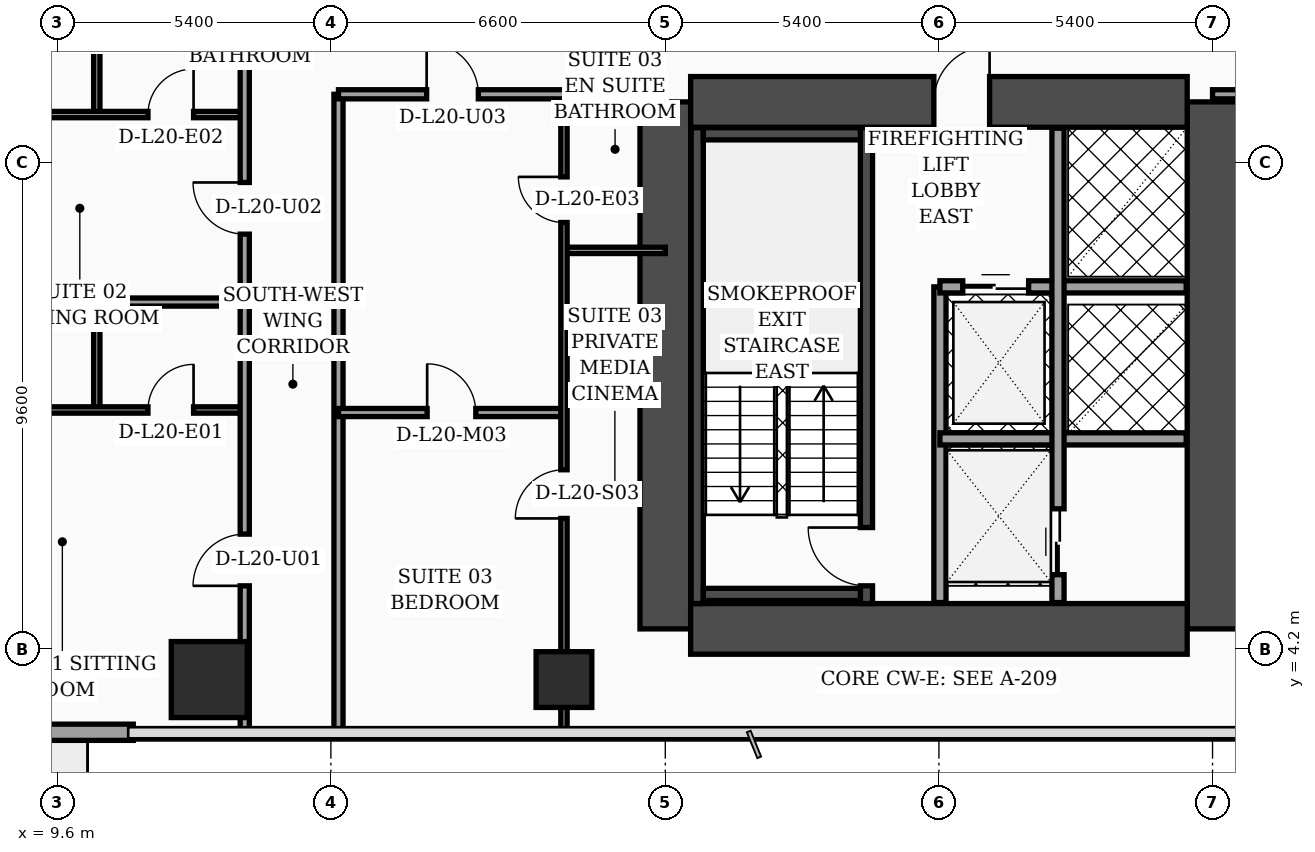
"""IFC4 building model, lengths in metres.
Left out: names, types, materials, properties, quantities, classifications, styles, units other than length and angle.
Written with IfcOpenShell. Run it as: python <this file> out.ifc"""

import sys

from ifc_helpers import new_model, si_unit, direction, frame, frame_2d, origin, origin_2d, place, context, subcontext, project, spatial, rectangle, hollow_rectangle, extrude, element, fill, save


model = new_model("IFC4")
c1 = context("Model", 3, precision=1e-05, world=origin(), true_north=direction((0.0, 1.0)))
c2 = subcontext(c1, "Body", "Model", "MODEL_VIEW")
j1 = project(units=[si_unit("LENGTHUNIT", "METRE"), si_unit("PLANEANGLEUNIT", "RADIAN")], contexts=[c1])
p1 = place(None, origin())
s1 = spatial("IfcSite", under=j1, at=p1, CompositionType="ELEMENT")
p2 = place(p1, origin())
s2 = spatial("IfcBuilding", under=s1, at=p2, CompositionType="ELEMENT")
p3 = place(p2, frame((0.0, 0.0, 85.0)))
s3 = spatial("IfcBuildingStorey", under=s2, at=p3, CompositionType="ELEMENT", Elevation=85.0)
for number, where, z_axis, x_axis in (
    (1, (21.6, 4.6, 0.0), (0.0, 0.0, 1.0), (0.0, 1.0, 0.0)),
    (2, (32.4, 4.6, 0.0), (0.0, 0.0, 1.0), (0.0, 1.0, 0.0)),
):
    element("IfcWall", number, at=place(p3, frame(where, z_axis=z_axis, x_axis=x_axis)), inside=s3, PredefinedType="SHEAR", context=c2, shape_type="SweptSolid", body=[
        extrude(rectangle(XDim=10.4, YDim=1.0, at=frame_2d((5.2, 0.0))), origin(), (0.0, 0.0, 1.0), 3.56),
    ])
p4 = place(p3, frame((22.1, 15.0, 0.0), z_axis=(0.0, 0.0, 1.0), x_axis=(1.0, 0.0, 0.0)))
e3 = element("IfcWall", 3, at=p4, inside=s3, PredefinedType="SHEAR", context=c2, shape_type="SweptSolid", body=[
    extrude(rectangle(XDim=9.8, YDim=1.0, at=frame_2d((4.9, 0.0))), origin(), (0.0, 0.0, 1.0), 3.56),
])
p5 = place(p4, frame((4.8, 0.0, 0.0)))
e4 = element("IfcOpeningElement", 4, at=p5, cuts=e3, PredefinedType="OPENING", context=c2, shape_type="SweptSolid", body=[
    extrude(rectangle(XDim=1.1, YDim=2.2, at=frame_2d((0.55, 1.1))), frame((0.0, 0.51, 0.0), z_axis=(0.0, -1.0, 0.0), x_axis=(1.0, 0.0, 0.0)), (0.0, 0.0, 1.0), 1.02),
])
p6 = place(p3, frame((22.1, 4.6, 0.0), z_axis=(0.0, 0.0, 1.0), x_axis=(1.0, 0.0, 0.0)))
e5 = element("IfcWall", 5, at=p6, inside=s3, PredefinedType="SHEAR", context=c2, shape_type="SweptSolid", body=[
    extrude(rectangle(XDim=9.8, YDim=1.0, at=frame_2d((4.9, 0.0))), origin(), (0.0, 0.0, 1.0), 3.56),
])
p7 = place(p3, frame((22.23, 5.1, 0.0), z_axis=(0.0, 0.0, 1.0), x_axis=(0.0, 1.0, 0.0)))
e6 = element("IfcWall", 6, at=p7, inside=s3, PredefinedType="SOLIDWALL", context=c2, shape_type="SweptSolid", body=[
    extrude(rectangle(XDim=9.39, YDim=0.24, at=frame_2d((4.695, 0.0))), origin(), (0.0, 0.0, 1.0), 3.56),
])
p8 = place(p3, frame((25.57, 5.1, 0.0), z_axis=(0.0, 0.0, 1.0), x_axis=(0.0, 1.0, 0.0)))
e7 = element("IfcWall", 7, at=p8, inside=s3, PredefinedType="SOLIDWALL", context=c2, shape_type="SweptSolid", body=[
    extrude(rectangle(XDim=9.39, YDim=0.24, at=frame_2d((4.695, 0.0))), origin(), (0.0, 0.0, 1.0), 3.56),
])
p9 = place(p8, frame((0.35, 0.0, 0.0)))
e8 = element("IfcOpeningElement", 8, at=p9, cuts=e7, PredefinedType="OPENING", context=c2, shape_type="SweptSolid", body=[
    extrude(rectangle(XDim=1.15, YDim=2.2, at=frame_2d((0.575, 1.1))), frame((0.0, 0.13, 0.0), z_axis=(0.0, -1.0, 0.0), x_axis=(1.0, 0.0, 0.0)), (0.0, 0.0, 1.0), 0.26),
])
for number, where, z_axis, x_axis in (
    (9, (22.35, 5.28, 0.0), (0.0, 0.0, 1.0), (1.0, 0.0, 0.0)),
    (10, (22.35, 14.37, 0.0), (0.0, 0.0, 1.0), (1.0, 0.0, 0.0)),
):
    element("IfcWall", number, at=place(p3, frame(where, z_axis=z_axis, x_axis=x_axis)), inside=s3, PredefinedType="SOLIDWALL", context=c2, shape_type="SweptSolid", body=[
        extrude(rectangle(XDim=3.1, YDim=0.24, at=frame_2d((1.55, 0.0))), origin(), (0.0, 0.0, 1.0), 3.56),
    ])
p10 = place(p3, frame((12.6, 3.6, 0.0), z_axis=(0.0, 0.0, 1.0), x_axis=(1.0, 0.0, 0.0)))
e11 = element("IfcColumn", 11, at=p10, inside=s3, PredefinedType="COLUMN", context=c2, shape_type="SweptSolid", body=[
    extrude(rectangle(XDim=1.5, YDim=1.5, at=origin_2d()), origin(), (0.0, 0.0, 1.0), 3.56),
])
p11 = place(p3, frame((19.6, 3.6, 0.0), z_axis=(0.0, 0.0, 1.0), x_axis=(1.0, 0.0, 0.0)))
e12 = element("IfcColumn", 12, at=p11, inside=s3, PredefinedType="COLUMN", context=c2, shape_type="SweptSolid", body=[
    extrude(hollow_rectangle(XDim=1.1, YDim=1.1, WallThickness=0.045, at=origin_2d()), origin(), (0.0, 0.0, 1.0), 3.56),
])
p12 = place(p3, frame((3.1, 2.56, 0.0), z_axis=(0.0, 0.0, 1.0), x_axis=(1.0, 0.0, 0.0)))
e13 = element("IfcWall", 13, at=p12, inside=s3, PredefinedType="SOLIDWALL", context=c2, shape_type="SweptSolid", body=[
    extrude(rectangle(XDim=8.0, YDim=0.32, at=frame_2d((4.0, 0.0))), origin(), (0.0, 0.0, 1.0), 3.56),
])
p13 = place(p12, frame((0.45, 0.0, 0.75)))
e14 = element("IfcOpeningElement", 14, at=p13, cuts=e13, PredefinedType="OPENING", context=c2, shape_type="SweptSolid", body=[
    extrude(rectangle(XDim=1.0, YDim=1.6, at=frame_2d((0.5, 0.8))), frame((0.0, 0.17, 0.0), z_axis=(0.0, -1.0, 0.0), x_axis=(1.0, 0.0, 0.0)), (0.0, 0.0, 1.0), 0.34),
])
p14 = place(p12, frame((4.2, 0.0, 0.0)))
e15 = element("IfcOpeningElement", 15, at=p14, cuts=e13, PredefinedType="OPENING", context=c2, shape_type="SweptSolid", body=[
    extrude(rectangle(XDim=1.4, YDim=2.25, at=frame_2d((0.7, 1.125))), frame((0.0, 0.17, 0.0), z_axis=(0.0, -1.0, 0.0), x_axis=(1.0, 0.0, 0.0)), (0.0, 0.0, 1.0), 0.34),
])
p15 = place(p3, frame((27.02, 5.12, 0.0), z_axis=(0.0, 0.0, 1.0), x_axis=(0.0, 1.0, 0.0)))
e16 = element("IfcWall", 16, at=p15, inside=s3, PredefinedType="SOLIDWALL", context=c2, shape_type="SweptSolid", body=[
    extrude(rectangle(XDim=6.23, YDim=0.24, at=frame_2d((3.115, 0.0))), origin(), (0.0, 0.0, 1.0), 3.56),
])
p16 = place(p3, frame((27.02, 11.35, 0.0), z_axis=(0.0, 0.0, 1.0), x_axis=(1.0, 0.0, 0.0)))
e17 = element("IfcWall", 17, at=p16, inside=s3, PredefinedType="SOLIDWALL", context=c2, shape_type="SweptSolid", body=[
    extrude(rectangle(XDim=4.86, YDim=0.24, at=frame_2d((2.43, 0.0))), origin(), (0.0, 0.0, 1.0), 3.56),
])
p17 = place(p16, frame((0.45, 0.0, 0.0)))
e18 = element("IfcOpeningElement", 18, at=p17, cuts=e17, PredefinedType="OPENING", context=c2, shape_type="SweptSolid", body=[
    extrude(rectangle(XDim=1.3, YDim=2.35, at=frame_2d((0.65, 1.175))), frame((0.0, 0.13, 0.0), z_axis=(0.0, -1.0, 0.0), x_axis=(1.0, 0.0, 0.0)), (0.0, 0.0, 1.0), 0.26),
])
p18 = place(p3, frame((27.02, 8.35, 0.0), z_axis=(0.0, 0.0, 1.0), x_axis=(1.0, 0.0, 0.0)))
e19 = element("IfcWall", 19, at=p18, inside=s3, PredefinedType="SOLIDWALL", context=c2, shape_type="SweptSolid", body=[
    extrude(rectangle(XDim=4.86, YDim=0.24, at=frame_2d((2.43, 0.0))), origin(), (0.0, 0.0, 1.0), 3.56),
])
p19 = place(p3, frame((29.35, 5.12, 0.0), z_axis=(0.0, 0.0, 1.0), x_axis=(0.0, 1.0, 0.0)))
e20 = element("IfcWall", 20, at=p19, inside=s3, PredefinedType="SOLIDWALL", context=c2, shape_type="SweptSolid", body=[
    extrude(rectangle(XDim=9.36, YDim=0.24, at=frame_2d((4.68, 0.0))), origin(), (0.0, 0.0, 1.0), 3.56),
])
p20 = place(p19, frame((0.55, 0.0, 0.0)))
e21 = element("IfcOpeningElement", 21, at=p20, cuts=e20, PredefinedType="OPENING", context=c2, shape_type="SweptSolid", body=[
    extrude(rectangle(XDim=1.3, YDim=2.35, at=frame_2d((0.65, 1.175))), frame((0.0, 0.13, 0.0), z_axis=(0.0, -1.0, 0.0), x_axis=(1.0, 0.0, 0.0)), (0.0, 0.0, 1.0), 0.26),
])
p21 = place(p3, frame((10.38, 8.92, 0.0), z_axis=(0.0, 0.0, 1.0), x_axis=(0.0, 1.0, 0.0)))
e22 = element("IfcWall", 22, at=p21, inside=s3, PredefinedType="PARTITIONING", context=c2, shape_type="SweptSolid", body=[
    extrude(rectangle(XDim=2.13, YDim=0.125, at=frame_2d((1.065, 0.0))), origin(), (0.0, 0.0, 1.0), 3.14),
])
p22 = place(p3, frame((3.2, 8.92, 0.0), z_axis=(0.0, 0.0, 1.0), x_axis=(1.0, 0.0, 0.0)))
e23 = element("IfcWall", 23, at=p22, inside=s3, PredefinedType="PARTITIONING", context=c2, shape_type="SweptSolid", body=[
    extrude(rectangle(XDim=10.1, YDim=0.125, at=frame_2d((5.05, 0.0))), origin(), (0.0, 0.0, 1.0), 2.84),
])
p23 = place(p22, frame((3.29, 0.0, 0.0)))
e24 = element("IfcOpeningElement", 24, at=p23, cuts=e23, PredefinedType="OPENING", context=c2, shape_type="SweptSolid", body=[
    extrude(rectangle(XDim=0.96, YDim=2.2, at=frame_2d((0.48, 1.1))), frame((0.0, 0.073, 0.0), z_axis=(0.0, -1.0, 0.0), x_axis=(1.0, 0.0, 0.0)), (0.0, 0.0, 1.0), 0.145),
])
p24 = place(p22, frame((8.19, 0.0, 0.0)))
e25 = element("IfcOpeningElement", 25, at=p24, cuts=e23, PredefinedType="OPENING", context=c2, shape_type="SweptSolid", body=[
    extrude(rectangle(XDim=0.9, YDim=2.15, at=frame_2d((0.45, 1.075))), frame((0.0, 0.073, 0.0), z_axis=(0.0, -1.0, 0.0), x_axis=(1.0, 0.0, 0.0)), (0.0, 0.0, 1.0), 0.145),
])
p25 = place(p3, frame((10.38, 14.75, 0.0), z_axis=(0.0, 0.0, 1.0), x_axis=(0.0, 1.0, 0.0)))
e26 = element("IfcWall", 26, at=p25, inside=s3, PredefinedType="PARTITIONING", context=c2, shape_type="SweptSolid", body=[
    extrude(rectangle(XDim=2.05, YDim=0.125, at=frame_2d((1.025, 0.0))), origin(), (0.0, 0.0, 1.0), 3.56),
])
p26 = place(p3, frame((0.08, 14.75, 0.0), z_axis=(0.0, 0.0, 1.0), x_axis=(1.0, 0.0, 0.0)))
e27 = element("IfcWall", 27, at=p26, inside=s3, PredefinedType="PARTITIONING", context=c2, shape_type="SweptSolid", body=[
    extrude(rectangle(XDim=13.22, YDim=0.125, at=frame_2d((6.61, 0.0))), origin(), (0.0, 0.0, 1.0), 2.84),
])
p27 = place(p26, frame((4.67, 0.0, 0.0)))
e28 = element("IfcOpeningElement", 28, at=p27, cuts=e27, PredefinedType="OPENING", context=c2, shape_type="SweptSolid", body=[
    extrude(rectangle(XDim=0.96, YDim=2.2, at=frame_2d((0.48, 1.1))), frame((0.0, 0.073, 0.0), z_axis=(0.0, -1.0, 0.0), x_axis=(1.0, 0.0, 0.0)), (0.0, 0.0, 1.0), 0.145),
])
p28 = place(p26, frame((11.31, 0.0, 0.0)))
e29 = element("IfcOpeningElement", 29, at=p28, cuts=e27, PredefinedType="OPENING", context=c2, shape_type="SweptSolid", body=[
    extrude(rectangle(XDim=0.9, YDim=2.15, at=frame_2d((0.45, 1.075))), frame((0.0, 0.073, 0.0), z_axis=(0.0, -1.0, 0.0), x_axis=(1.0, 0.0, 0.0)), (0.0, 0.0, 1.0), 0.145),
])
p29 = place(p3, frame((0.08, 11.05, 0.0), z_axis=(0.0, 0.0, 1.0), x_axis=(1.0, 0.0, 0.0)))
e30 = element("IfcWall", 30, at=p29, inside=s3, PredefinedType="PARTITIONING", context=c2, shape_type="SweptSolid", body=[
    extrude(rectangle(XDim=13.22, YDim=0.16, at=frame_2d((6.61, 0.0))), origin(), (0.0, 0.0, 1.0), 2.84),
])
p30 = place(p3, frame((13.3, 2.44, 0.0), z_axis=(0.0, 0.0, 1.0), x_axis=(0.0, 1.0, 0.0)))
e31 = element("IfcWall", 31, at=p30, inside=s3, PredefinedType="PARTITIONING", context=c2, shape_type="SweptSolid", body=[
    extrude(rectangle(XDim=14.36, YDim=0.18, at=frame_2d((7.18, 0.0))), origin(), (0.0, 0.0, 1.0), 3.04),
])
p31 = place(p30, frame((3.01, 0.0, 0.0)))
e32 = element("IfcOpeningElement", 32, at=p31, cuts=e31, PredefinedType="OPENING", context=c2, shape_type="SweptSolid", body=[
    extrude(rectangle(XDim=1.02, YDim=2.2, at=frame_2d((0.51, 1.1))), frame((0.0, 0.1, 0.0), z_axis=(0.0, -1.0, 0.0), x_axis=(1.0, 0.0, 0.0)), (0.0, 0.0, 1.0), 0.2),
])
p32 = place(p30, frame((9.95, 0.0, 0.0)))
e33 = element("IfcOpeningElement", 33, at=p32, cuts=e31, PredefinedType="OPENING", context=c2, shape_type="SweptSolid", body=[
    extrude(rectangle(XDim=1.02, YDim=2.2, at=frame_2d((0.51, 1.1))), frame((0.0, 0.1, 0.0), z_axis=(0.0, -1.0, 0.0), x_axis=(1.0, 0.0, 0.0)), (0.0, 0.0, 1.0), 0.2),
])
p33 = place(p3, frame((15.15, 2.44, 0.0), z_axis=(0.0, 0.0, 1.0), x_axis=(0.0, 1.0, 0.0)))
e34 = element("IfcWall", 34, at=p33, inside=s3, PredefinedType="PARTITIONING", context=c2, shape_type="SweptSolid", body=[
    extrude(rectangle(XDim=12.71, YDim=0.18, at=frame_2d((6.355, 0.0))), origin(), (0.0, 0.0, 1.0), 3.04),
])
p34 = place(p3, frame((19.6, 12.07, 0.0), z_axis=(0.0, 0.0, 1.0), x_axis=(1.0, 0.0, 0.0)))
e35 = element("IfcWall", 35, at=p34, inside=s3, PredefinedType="PARTITIONING", context=c2, shape_type="SweptSolid", body=[
    extrude(rectangle(XDim=2.0, YDim=0.125, at=frame_2d((1.0, 0.0))), origin(), (0.0, 0.0, 1.0), 3.56),
])
p35 = place(p3, frame((15.15, 8.87, 0.0), z_axis=(0.0, 0.0, 1.0), x_axis=(1.0, 0.0, 0.0)))
e36 = element("IfcWall", 36, at=p35, inside=s3, PredefinedType="PARTITIONING", context=c2, shape_type="SweptSolid", body=[
    extrude(rectangle(XDim=4.45, YDim=0.16, at=frame_2d((2.225, 0.0))), origin(), (0.0, 0.0, 1.0), 3.56),
])
p36 = place(p35, frame((1.75, 0.0, 0.0)))
e37 = element("IfcOpeningElement", 37, at=p36, cuts=e36, PredefinedType="OPENING", context=c2, shape_type="SweptSolid", body=[
    extrude(rectangle(XDim=0.96, YDim=2.2, at=frame_2d((0.48, 1.1))), frame((0.0, 0.09, 0.0), z_axis=(0.0, -1.0, 0.0), x_axis=(1.0, 0.0, 0.0)), (0.0, 0.0, 1.0), 0.18),
])
p37 = place(p3, frame((19.6, 2.44, 0.0), z_axis=(0.0, 0.0, 1.0), x_axis=(0.0, 1.0, 0.0)))
e38 = element("IfcWall", 38, at=p37, inside=s3, PredefinedType="PARTITIONING", context=c2, shape_type="SweptSolid", body=[
    extrude(rectangle(XDim=12.71, YDim=0.125, at=frame_2d((6.355, 0.0))), origin(), (0.0, 0.0, 1.0), 2.34),
])
p38 = place(p37, frame((4.34, 0.0, 0.0)))
e39 = element("IfcOpeningElement", 39, at=p38, cuts=e38, PredefinedType="OPENING", context=c2, shape_type="SweptSolid", body=[
    extrude(rectangle(XDim=0.96, YDim=2.2, at=frame_2d((0.48, 1.1))), frame((0.0, 0.073, 0.0), z_axis=(0.0, -1.0, 0.0), x_axis=(1.0, 0.0, 0.0)), (0.0, 0.0, 1.0), 0.145),
])
p39 = place(p37, frame((10.18, 0.0, 0.0)))
e40 = element("IfcOpeningElement", 40, at=p39, cuts=e38, PredefinedType="OPENING", context=c2, shape_type="SweptSolid", body=[
    extrude(rectangle(XDim=0.9, YDim=2.15, at=frame_2d((0.45, 1.075))), frame((0.0, 0.073, 0.0), z_axis=(0.0, -1.0, 0.0), x_axis=(1.0, 0.0, 0.0)), (0.0, 0.0, 1.0), 0.145),
])
p40 = place(p3, frame((15.15, 15.15, 0.0), z_axis=(0.0, 0.0, 1.0), x_axis=(1.0, 0.0, 0.0)))
e41 = element("IfcWall", 41, at=p40, inside=s3, PredefinedType="PARTITIONING", context=c2, shape_type="SweptSolid", body=[
    extrude(rectangle(XDim=6.45, YDim=0.18, at=frame_2d((3.225, 0.0))), origin(), (0.0, 0.0, 1.0), 2.34),
])
p41 = place(p40, frame((1.74, 0.0, 0.0)))
e42 = element("IfcOpeningElement", 42, at=p41, cuts=e41, PredefinedType="OPENING", context=c2, shape_type="SweptSolid", body=[
    extrude(rectangle(XDim=1.02, YDim=2.2, at=frame_2d((0.51, 1.1))), frame((0.0, 0.1, 0.0), z_axis=(0.0, -1.0, 0.0), x_axis=(1.0, 0.0, 0.0)), (0.0, 0.0, 1.0), 0.2),
])
p42 = place(p3, frame((32.4, 15.15, 0.0), z_axis=(0.0, 0.0, 1.0), x_axis=(1.0, 0.0, 0.0)))
e43 = element("IfcWall", 43, at=p42, inside=s3, PredefinedType="PARTITIONING", context=c2, shape_type="SweptSolid", body=[
    extrude(rectangle(XDim=20.85, YDim=0.18, at=frame_2d((10.425, 0.0))), origin(), (0.0, 0.0, 1.0), 2.84),
])
p43 = place(p42, frame((1.1, 0.0, 0.0)))
e44 = element("IfcOpeningElement", 44, at=p43, cuts=e43, PredefinedType="OPENING", context=c2, shape_type="SweptSolid", body=[
    extrude(rectangle(XDim=1.5, YDim=2.22, at=frame_2d((0.75, 1.11))), frame((0.0, 0.1, 0.0), z_axis=(0.0, -1.0, 0.0), x_axis=(1.0, 0.0, 0.0)), (0.0, 0.0, 1.0), 0.2),
])
p44 = place(p42, frame((9.94, 0.0, 0.0)))
e45 = element("IfcOpeningElement", 45, at=p44, cuts=e43, PredefinedType="OPENING", context=c2, shape_type="SweptSolid", body=[
    extrude(rectangle(XDim=1.02, YDim=2.2, at=frame_2d((0.51, 1.1))), frame((0.0, 0.1, 0.0), z_axis=(0.0, -1.0, 0.0), x_axis=(1.0, 0.0, 0.0)), (0.0, 0.0, 1.0), 0.2),
])
p45 = place(p42, frame((15.92, 0.0, 0.0)))
e46 = element("IfcOpeningElement", 46, at=p45, cuts=e43, PredefinedType="OPENING", context=c2, shape_type="SweptSolid", body=[
    extrude(rectangle(XDim=1.02, YDim=2.2, at=frame_2d((0.51, 1.1))), frame((0.0, 0.1, 0.0), z_axis=(0.0, -1.0, 0.0), x_axis=(1.0, 0.0, 0.0)), (0.0, 0.0, 1.0), 0.2),
])
p46 = place(p17, origin())
e47 = element("IfcDoor", 47, at=p46, inside=s3, OperationType="DOUBLE_DOOR_SLIDING", PredefinedType="DOOR", context=c2, shape_type="SweptSolid", body=[
    extrude(rectangle(XDim=1.3, YDim=2.35, at=frame_2d((0.65, 1.175))), frame((0.0, 0.025, 0.0), z_axis=(0.0, -1.0, 0.0), x_axis=(1.0, 0.0, 0.0)), (0.0, 0.0, 1.0), 0.05),
])
fill(e18, e47)
p47 = place(p20, origin())
e48 = element("IfcDoor", 48, at=p47, inside=s3, OperationType="DOUBLE_DOOR_SLIDING", PredefinedType="DOOR", context=c2, shape_type="SweptSolid", body=[
    extrude(rectangle(XDim=1.3, YDim=2.35, at=frame_2d((0.65, 1.175))), frame((0.0, 0.025, 0.0), z_axis=(0.0, -1.0, 0.0), x_axis=(1.0, 0.0, 0.0)), (0.0, 0.0, 1.0), 0.05),
])
fill(e21, e48)
p48 = place(p24, origin())
e49 = element("IfcDoor", 49, at=p48, inside=s3, OperationType="SINGLE_SWING_RIGHT", PredefinedType="DOOR", context=c2, shape_type="SweptSolid", body=[
    extrude(rectangle(XDim=0.9, YDim=2.15, at=frame_2d((0.45, 1.075))), frame((0.0, 0.025, 0.0), z_axis=(0.0, -1.0, 0.0), x_axis=(1.0, 0.0, 0.0)), (0.0, 0.0, 1.0), 0.05),
])
fill(e25, e49)
p49 = place(p28, origin())
e50 = element("IfcDoor", 50, at=p49, inside=s3, OperationType="SINGLE_SWING_RIGHT", PredefinedType="DOOR", context=c2, shape_type="SweptSolid", body=[
    extrude(rectangle(XDim=0.9, YDim=2.15, at=frame_2d((0.45, 1.075))), frame((0.0, 0.025, 0.0), z_axis=(0.0, -1.0, 0.0), x_axis=(1.0, 0.0, 0.0)), (0.0, 0.0, 1.0), 0.05),
])
fill(e29, e50)
p50 = place(p31, origin())
e51 = element("IfcDoor", 51, at=p50, inside=s3, OperationType="SINGLE_SWING_LEFT", PredefinedType="DOOR", context=c2, shape_type="SweptSolid", body=[
    extrude(rectangle(XDim=1.02, YDim=2.2, at=frame_2d((0.51, 1.1))), frame((0.0, 0.025, 0.0), z_axis=(0.0, -1.0, 0.0), x_axis=(1.0, 0.0, 0.0)), (0.0, 0.0, 1.0), 0.05),
])
fill(e32, e51)
p51 = place(p32, origin())
e52 = element("IfcDoor", 52, at=p51, inside=s3, OperationType="SINGLE_SWING_RIGHT", PredefinedType="DOOR", context=c2, shape_type="SweptSolid", body=[
    extrude(rectangle(XDim=1.02, YDim=2.2, at=frame_2d((0.51, 1.1))), frame((0.0, 0.025, 0.0), z_axis=(0.0, -1.0, 0.0), x_axis=(1.0, 0.0, 0.0)), (0.0, 0.0, 1.0), 0.05),
])
fill(e33, e52)
p52 = place(p36, origin())
e53 = element("IfcDoor", 53, at=p52, inside=s3, OperationType="SINGLE_SWING_LEFT", PredefinedType="DOOR", context=c2, shape_type="SweptSolid", body=[
    extrude(rectangle(XDim=0.96, YDim=2.2, at=frame_2d((0.48, 1.1))), frame((0.0, 0.025, 0.0), z_axis=(0.0, -1.0, 0.0), x_axis=(1.0, 0.0, 0.0)), (0.0, 0.0, 1.0), 0.05),
])
fill(e37, e53)
p53 = place(p38, origin())
e54 = element("IfcDoor", 54, at=p53, inside=s3, OperationType="SINGLE_SWING_LEFT", PredefinedType="DOOR", context=c2, shape_type="SweptSolid", body=[
    extrude(rectangle(XDim=0.96, YDim=2.2, at=frame_2d((0.48, 1.1))), frame((0.0, 0.025, 0.0), z_axis=(0.0, -1.0, 0.0), x_axis=(1.0, 0.0, 0.0)), (0.0, 0.0, 1.0), 0.05),
])
fill(e39, e54)
p54 = place(p39, origin())
e55 = element("IfcDoor", 55, at=p54, inside=s3, OperationType="SINGLE_SWING_RIGHT", PredefinedType="DOOR", context=c2, shape_type="SweptSolid", body=[
    extrude(rectangle(XDim=0.9, YDim=2.15, at=frame_2d((0.45, 1.075))), frame((0.0, 0.025, 0.0), z_axis=(0.0, -1.0, 0.0), x_axis=(1.0, 0.0, 0.0)), (0.0, 0.0, 1.0), 0.05),
])
fill(e40, e55)
p55 = place(p41, origin())
e56 = element("IfcDoor", 56, at=p55, inside=s3, OperationType="SINGLE_SWING_LEFT", PredefinedType="DOOR", context=c2, shape_type="SweptSolid", body=[
    extrude(rectangle(XDim=1.02, YDim=2.2, at=frame_2d((0.51, 1.1))), frame((0.0, 0.025, 0.0), z_axis=(0.0, -1.0, 0.0), x_axis=(1.0, 0.0, 0.0)), (0.0, 0.0, 1.0), 0.05),
])
fill(e42, e56)
p56 = place(p9, origin())
e57 = element("IfcDoor", 57, at=p56, inside=s3, OperationType="SINGLE_SWING_RIGHT", PredefinedType="DOOR", context=c2, shape_type="SweptSolid", body=[
    extrude(rectangle(XDim=1.15, YDim=2.2, at=frame_2d((0.575, 1.1))), frame((0.0, 0.025, 0.0), z_axis=(0.0, -1.0, 0.0), x_axis=(1.0, 0.0, 0.0)), (0.0, 0.0, 1.0), 0.05),
])
fill(e8, e57)
p57 = place(p5, origin())
e58 = element("IfcDoor", 58, at=p57, inside=s3, OperationType="SINGLE_SWING_RIGHT", PredefinedType="DOOR", context=c2, shape_type="SweptSolid", body=[
    extrude(rectangle(XDim=1.1, YDim=2.2, at=frame_2d((0.55, 1.1))), frame((0.0, 0.025, 0.0), z_axis=(0.0, -1.0, 0.0), x_axis=(1.0, 0.0, 0.0)), (0.0, 0.0, 1.0), 0.05),
])
fill(e4, e58)
save(model, sys.argv[1])
